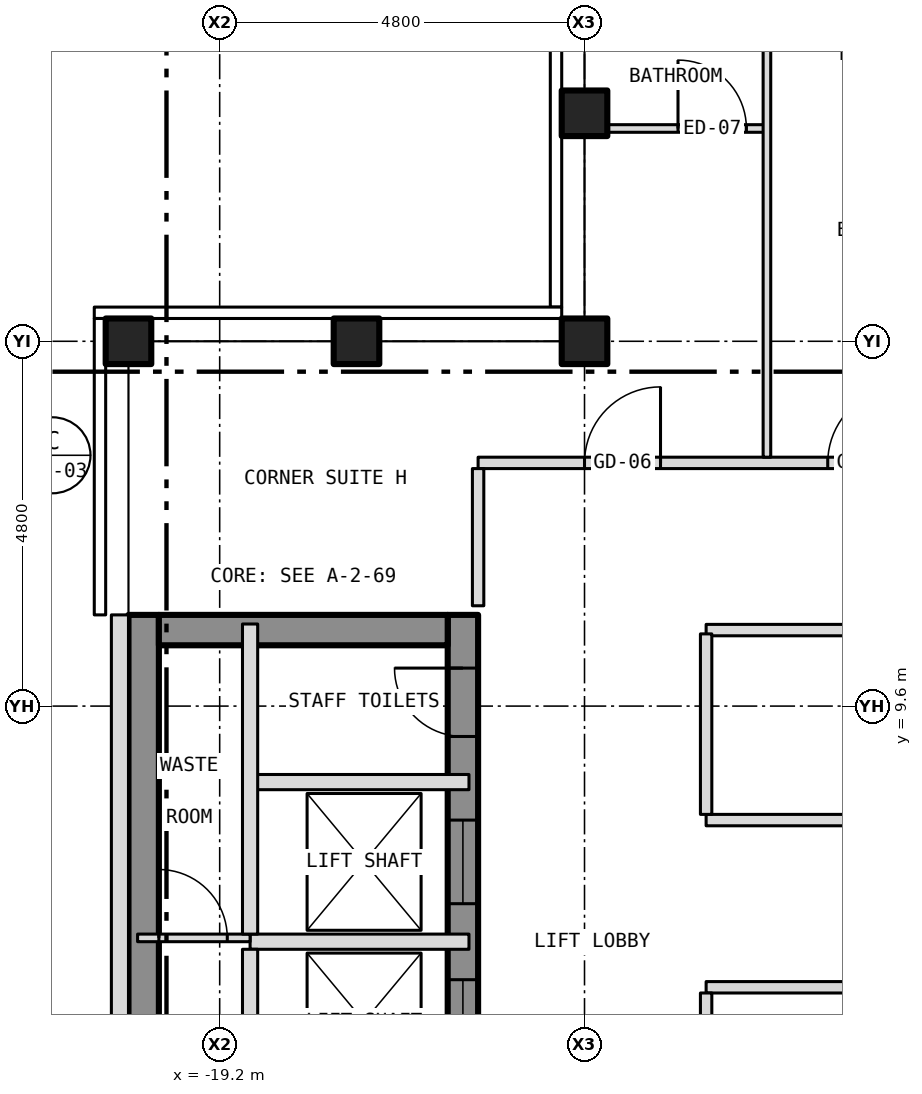
"""IFC4 building model, lengths in metres.
Left out: names, types, materials, properties, quantities, classifications, styles, units other than length and angle.
Written with IfcOpenShell. Run it as: python <this file> out.ifc"""

import sys

from ifc_helpers import new_model, si_unit, direction, frame, frame_2d, origin, origin_2d, place, context, subcontext, project, spatial, rectangle, hollow_rectangle, extrude, element, fill, save


model = new_model("IFC4")
c1 = context("Model", 3, precision=1e-05, world=origin(), true_north=direction((0.0, 1.0)))
c2 = subcontext(c1, "Body", "Model", "MODEL_VIEW")
j1 = project(units=[si_unit("LENGTHUNIT", "METRE"), si_unit("PLANEANGLEUNIT", "RADIAN")], contexts=[c1])
p1 = place(None, origin())
s1 = spatial("IfcSite", under=j1, at=p1, CompositionType="ELEMENT")
p2 = place(p1, origin())
s2 = spatial("IfcBuilding", under=s1, at=p2, CompositionType="ELEMENT")
p3 = place(p2, frame((0.0, 0.0, 251.5)))
s3 = spatial("IfcBuildingStorey", under=s2, at=p3, CompositionType="ELEMENT", Elevation=251.5)
for number, where, z_axis, x_axis in (
    (1, (-20.4, 14.4, -0.15), (0.0, 0.0, 1.0), (1.0, 0.0, 0.0)),
    (2, (-14.4, 14.4, -0.15), (0.0, 0.0, 1.0), (1.0, 0.0, 0.0)),
    (3, (-14.4, 17.4, -0.15), (0.0, 0.0, 1.0), (1.0, 0.0, 0.0)),
    (4, (-17.4, 14.4, -0.15), (0.0, 0.0, 1.0), (1.0, 0.0, 0.0)),
):
    element("IfcColumn", number, at=place(p3, frame(where, z_axis=z_axis, x_axis=x_axis)), inside=s3, PredefinedType="COLUMN", context=c2, shape_type="SweptSolid", body=[
        extrude(hollow_rectangle(XDim=0.6, YDim=0.6, WallThickness=0.03, at=origin_2d()), origin(), (0.0, 0.0, 1.0), 3.5),
    ])
p4 = place(p3, frame((-16.0, -10.8, 0.0), z_axis=(0.0, 0.0, 1.0), x_axis=(0.0, 1.0, 0.0)))
e5 = element("IfcWall", 5, at=p4, inside=s3, PredefinedType="SHEAR", context=c2, shape_type="SweptSolid", body=[
    extrude(rectangle(XDim=21.6, YDim=0.4, at=frame_2d((10.8, 0.0))), origin(), (0.0, 0.0, 1.0), 3.25),
])
p5 = place(p4, frame((9.4, 0.0, 0.0)))
e6 = element("IfcOpeningElement", 6, at=p5, cuts=e5, PredefinedType="OPENING", context=c2, shape_type="SweptSolid", body=[
    extrude(rectangle(XDim=1.1, YDim=2.1, at=frame_2d((0.55, 1.05))), frame((0.0, 0.212, 0.0), z_axis=(0.0, -1.0, 0.0), x_axis=(1.0, 0.0, 0.0)), (0.0, 0.0, 1.0), 0.424),
])
p6 = place(p4, frame((11.5, 0.0, 0.0)))
e7 = element("IfcOpeningElement", 7, at=p6, cuts=e5, PredefinedType="OPENING", context=c2, shape_type="SweptSolid", body=[
    extrude(rectangle(XDim=1.1, YDim=2.1, at=frame_2d((0.55, 1.05))), frame((0.0, 0.212, 0.0), z_axis=(0.0, -1.0, 0.0), x_axis=(1.0, 0.0, 0.0)), (0.0, 0.0, 1.0), 0.424),
])
p7 = place(p4, frame((13.6, 0.0, 0.0)))
e8 = element("IfcOpeningElement", 8, at=p7, cuts=e5, PredefinedType="OPENING", context=c2, shape_type="SweptSolid", body=[
    extrude(rectangle(XDim=1.1, YDim=2.1, at=frame_2d((0.55, 1.05))), frame((0.0, 0.212, 0.0), z_axis=(0.0, -1.0, 0.0), x_axis=(1.0, 0.0, 0.0)), (0.0, 0.0, 1.0), 0.424),
])
p8 = place(p4, frame((15.7, 0.0, 0.0)))
e9 = element("IfcOpeningElement", 9, at=p8, cuts=e5, PredefinedType="OPENING", context=c2, shape_type="SweptSolid", body=[
    extrude(rectangle(XDim=1.1, YDim=2.1, at=frame_2d((0.55, 1.05))), frame((0.0, 0.212, 0.0), z_axis=(0.0, -1.0, 0.0), x_axis=(1.0, 0.0, 0.0)), (0.0, 0.0, 1.0), 0.424),
])
p9 = place(p4, frame((17.8, 0.0, 0.0)))
e10 = element("IfcOpeningElement", 10, at=p9, cuts=e5, PredefinedType="OPENING", context=c2, shape_type="SweptSolid", body=[
    extrude(rectangle(XDim=1.1, YDim=2.1, at=frame_2d((0.55, 1.05))), frame((0.0, 0.212, 0.0), z_axis=(0.0, -1.0, 0.0), x_axis=(1.0, 0.0, 0.0)), (0.0, 0.0, 1.0), 0.424),
])
p10 = place(p4, frame((0.458, 0.0, 0.0)))
e11 = element("IfcOpeningElement", 11, at=p10, cuts=e5, PredefinedType="OPENING", context=c2, shape_type="SweptSolid", body=[
    extrude(rectangle(XDim=1.1, YDim=2.1, at=frame_2d((0.55, 1.05))), frame((0.0, 0.212, 0.0), z_axis=(0.0, -1.0, 0.0), x_axis=(1.0, 0.0, 0.0)), (0.0, 0.0, 1.0), 0.424),
])
p11 = place(p4, frame((7.5, 0.0, 0.0)))
e12 = element("IfcOpeningElement", 12, at=p11, cuts=e5, PredefinedType="OPENING", context=c2, shape_type="SweptSolid", body=[
    extrude(rectangle(XDim=1.1, YDim=2.1, at=frame_2d((0.55, 1.05))), frame((0.0, 0.212, 0.0), z_axis=(0.0, -1.0, 0.0), x_axis=(1.0, 0.0, 0.0)), (0.0, 0.0, 1.0), 0.424),
])
p12 = place(p4, frame((20.0, 0.0, 0.0)))
e13 = element("IfcOpeningElement", 13, at=p12, cuts=e5, PredefinedType="OPENING", context=c2, shape_type="SweptSolid", body=[
    extrude(rectangle(XDim=0.9, YDim=2.1, at=frame_2d((0.45, 1.05))), frame((0.0, 0.212, 0.0), z_axis=(0.0, -1.0, 0.0), x_axis=(1.0, 0.0, 0.0)), (0.0, 0.0, 1.0), 0.424),
])
p13 = place(p3, frame((-20.2, -10.8, 0.0), z_axis=(0.0, 0.0, 1.0), x_axis=(0.0, 1.0, 0.0)))
e14 = element("IfcWall", 14, at=p13, inside=s3, PredefinedType="SHEAR", context=c2, shape_type="SweptSolid", body=[
    extrude(rectangle(XDim=21.6, YDim=0.4, at=frame_2d((10.8, 0.0))), origin(), (0.0, 0.0, 1.0), 3.25),
])
p14 = place(p3, frame((-20.0, 10.6, 0.0), z_axis=(0.0, 0.0, 1.0), x_axis=(1.0, 0.0, 0.0)))
e15 = element("IfcWall", 15, at=p14, inside=s3, PredefinedType="SHEAR", context=c2, shape_type="SweptSolid", body=[
    extrude(rectangle(XDim=3.8, YDim=0.4, at=frame_2d((1.9, 0.0))), origin(), (0.0, 0.0, 1.0), 3.25),
])
p15 = place(p3, frame((-20.512, 10.8, 0.0), z_axis=(0.0, 0.0, 1.0), x_axis=(0.0, -1.0, 0.0)))
e16 = element("IfcWall", 16, at=p15, inside=s3, PredefinedType="SOLIDWALL", context=c2, shape_type="SweptSolid", body=[
    extrude(rectangle(XDim=21.6, YDim=0.225, at=frame_2d((10.8, 0.0))), origin(), (0.0, 0.0, 1.0), 3.5),
])
p16 = place(p15, frame((18.05, 0.0, 1.0)))
e17 = element("IfcOpeningElement", 17, at=p16, cuts=e16, PredefinedType="OPENING", context=c2, shape_type="SweptSolid", body=[
    extrude(rectangle(XDim=0.6, YDim=1.5, at=frame_2d((0.3, 0.75))), frame((0.0, 0.125, 0.0), z_axis=(0.0, -1.0, 0.0), x_axis=(1.0, 0.0, 0.0)), (0.0, 0.0, 1.0), 0.249),
])
p17 = place(p3, frame((-12.8, 5.9, 0.0), z_axis=(0.0, 0.0, 1.0), x_axis=(1.0, 0.0, 0.0)))
e18 = element("IfcWall", 18, at=p17, inside=s3, PredefinedType="PARTITIONING", context=c2, shape_type="SweptSolid", body=[
    extrude(rectangle(XDim=15.4, YDim=0.15, at=frame_2d((7.7, 0.0))), origin(), (0.0, 0.0, 1.0), 3.35),
])
p18 = place(p17, frame((8.85, 0.0, 0.0)))
e19 = element("IfcOpeningElement", 19, at=p18, cuts=e18, PredefinedType="OPENING", context=c2, shape_type="SweptSolid", body=[
    extrude(rectangle(XDim=0.9, YDim=2.1, at=frame_2d((0.45, 1.05))), frame((0.0, 0.087, 0.0), z_axis=(0.0, -1.0, 0.0), x_axis=(1.0, 0.0, 0.0)), (0.0, 0.0, 1.0), 0.174),
])
p19 = place(p3, frame((-18.8, 6.5, 0.0), z_axis=(0.0, 0.0, 1.0), x_axis=(1.0, 0.0, 0.0)))
e20 = element("IfcWall", 20, at=p19, inside=s3, PredefinedType="PARTITIONING", context=c2, shape_type="SweptSolid", body=[
    extrude(rectangle(XDim=2.88, YDim=0.2, at=frame_2d((1.44, 0.0))), origin(), (0.0, 0.0, 1.0), 3.25),
])
p20 = place(p3, frame((-20.28, 6.55, 0.0), z_axis=(0.0, 0.0, 1.0), x_axis=(1.0, 0.0, 0.0)))
e21 = element("IfcWall", 21, at=p20, inside=s3, PredefinedType="PARTITIONING", context=c2, shape_type="SweptSolid", body=[
    extrude(rectangle(XDim=1.48, YDim=0.1, at=frame_2d((0.74, 0.0))), origin(), (0.0, 0.0, 1.0), 3.25),
])
p21 = place(p20, frame((0.28, 0.0, 0.0)))
e22 = element("IfcOpeningElement", 22, at=p21, cuts=e21, PredefinedType="OPENING", context=c2, shape_type="SweptSolid", body=[
    extrude(rectangle(XDim=0.9, YDim=2.1, at=frame_2d((0.45, 1.05))), frame((0.0, 0.062, 0.0), z_axis=(0.0, -1.0, 0.0), x_axis=(1.0, 0.0, 0.0)), (0.0, 0.0, 1.0), 0.124),
])
p22 = place(p3, frame((-12.8, 8.1, 0.0), z_axis=(0.0, 0.0, 1.0), x_axis=(1.0, 0.0, 0.0)))
e23 = element("IfcWall", 23, at=p22, inside=s3, PredefinedType="PARTITIONING", context=c2, shape_type="SweptSolid", body=[
    extrude(rectangle(XDim=15.4, YDim=0.15, at=frame_2d((7.7, 0.0))), origin(), (0.0, 0.0, 1.0), 3.35),
])
p23 = place(p3, frame((-18.8, 8.6, 0.0), z_axis=(0.0, 0.0, 1.0), x_axis=(1.0, 0.0, 0.0)))
e24 = element("IfcWall", 24, at=p23, inside=s3, PredefinedType="PARTITIONING", context=c2, shape_type="SweptSolid", body=[
    extrude(rectangle(XDim=2.88, YDim=0.2, at=frame_2d((1.44, 0.0))), origin(), (0.0, 0.0, 1.0), 3.25),
])
p24 = place(p3, frame((-12.8, 10.6, 0.0), z_axis=(0.0, 0.0, 1.0), x_axis=(1.0, 0.0, 0.0)))
e25 = element("IfcWall", 25, at=p24, inside=s3, PredefinedType="PARTITIONING", context=c2, shape_type="SweptSolid", body=[
    extrude(rectangle(XDim=15.4, YDim=0.15, at=frame_2d((7.7, 0.0))), origin(), (0.0, 0.0, 1.0), 3.35),
])
p25 = place(p24, frame((8.85, 0.0, 0.0)))
e26 = element("IfcOpeningElement", 26, at=p25, cuts=e25, PredefinedType="OPENING", context=c2, shape_type="SweptSolid", body=[
    extrude(rectangle(XDim=0.9, YDim=2.1, at=frame_2d((0.45, 1.05))), frame((0.0, 0.087, 0.0), z_axis=(0.0, -1.0, 0.0), x_axis=(1.0, 0.0, 0.0)), (0.0, 0.0, 1.0), 0.174),
])
p26 = place(p3, frame((-15.8, 12.8, 0.0), z_axis=(0.0, 0.0, 1.0), x_axis=(1.0, 0.0, 0.0)))
e27 = element("IfcWall", 27, at=p26, inside=s3, PredefinedType="PARTITIONING", context=c2, shape_type="SweptSolid", body=[
    extrude(rectangle(XDim=31.6, YDim=0.15, at=frame_2d((15.8, 0.0))), origin(), (0.0, 0.0, 1.0), 3.35),
])
p27 = place(p26, frame((4.6, 0.0, 0.0)))
e28 = element("IfcOpeningElement", 28, at=p27, cuts=e27, PredefinedType="OPENING", context=c2, shape_type="SweptSolid", body=[
    extrude(rectangle(XDim=1.0, YDim=2.1, at=frame_2d((0.5, 1.05))), frame((0.0, 0.087, 0.0), z_axis=(0.0, -1.0, 0.0), x_axis=(1.0, 0.0, 0.0)), (0.0, 0.0, 1.0), 0.174),
])
p28 = place(p26, frame((10.26, 0.0, 0.0)))
e29 = element("IfcOpeningElement", 29, at=p28, cuts=e27, PredefinedType="OPENING", context=c2, shape_type="SweptSolid", body=[
    extrude(rectangle(XDim=1.0, YDim=2.1, at=frame_2d((0.5, 1.05))), frame((0.0, 0.087, 0.0), z_axis=(0.0, -1.0, 0.0), x_axis=(1.0, 0.0, 0.0)), (0.0, 0.0, 1.0), 0.174),
])
p29 = place(p26, frame((19.86, 0.0, 0.0)))
e30 = element("IfcOpeningElement", 30, at=p29, cuts=e27, PredefinedType="OPENING", context=c2, shape_type="SweptSolid", body=[
    extrude(rectangle(XDim=1.0, YDim=2.1, at=frame_2d((0.5, 1.05))), frame((0.0, 0.087, 0.0), z_axis=(0.0, -1.0, 0.0), x_axis=(1.0, 0.0, 0.0)), (0.0, 0.0, 1.0), 0.174),
])
p30 = place(p26, frame((1.4, 0.0, 0.0)))
e31 = element("IfcOpeningElement", 31, at=p30, cuts=e27, PredefinedType="OPENING", context=c2, shape_type="SweptSolid", body=[
    extrude(rectangle(XDim=1.0, YDim=2.1, at=frame_2d((0.5, 1.05))), frame((0.0, 0.087, 0.0), z_axis=(0.0, -1.0, 0.0), x_axis=(1.0, 0.0, 0.0)), (0.0, 0.0, 1.0), 0.174),
])
p31 = place(p26, frame((29.2, 0.0, 0.0)))
e32 = element("IfcOpeningElement", 32, at=p31, cuts=e27, PredefinedType="OPENING", context=c2, shape_type="SweptSolid", body=[
    extrude(rectangle(XDim=1.0, YDim=2.1, at=frame_2d((0.5, 1.05))), frame((0.0, 0.087, 0.0), z_axis=(0.0, -1.0, 0.0), x_axis=(1.0, 0.0, 0.0)), (0.0, 0.0, 1.0), 0.174),
])
p32 = place(p3, frame((-14.28, 17.2, 0.0), z_axis=(0.0, 0.0, 1.0), x_axis=(1.0, 0.0, 0.0)))
e33 = element("IfcWall", 33, at=p32, inside=s3, PredefinedType="PARTITIONING", context=c2, shape_type="SweptSolid", body=[
    extrude(rectangle(XDim=2.28, YDim=0.1, at=frame_2d((1.14, 0.0))), origin(), (0.0, 0.0, 1.0), 3.35),
])
p33 = place(p32, frame((1.11, 0.0, 0.0)))
e34 = element("IfcOpeningElement", 34, at=p33, cuts=e33, PredefinedType="OPENING", context=c2, shape_type="SweptSolid", body=[
    extrude(rectangle(XDim=0.9, YDim=2.1, at=frame_2d((0.45, 1.05))), frame((0.0, 0.062, 0.0), z_axis=(0.0, -1.0, 0.0), x_axis=(1.0, 0.0, 0.0)), (0.0, 0.0, 1.0), 0.124),
])
p34 = place(p3, frame((-18.8, 2.4, 0.0), z_axis=(0.0, 0.0, 1.0), x_axis=(0.0, 1.0, 0.0)))
e35 = element("IfcWall", 35, at=p34, inside=s3, PredefinedType="PARTITIONING", context=c2, shape_type="SweptSolid", body=[
    extrude(rectangle(XDim=4.0, YDim=0.2, at=frame_2d((2.0, 0.0))), origin(), (0.0, 0.0, 1.0), 3.25),
])
p35 = place(p3, frame((-18.8, 6.6, 0.0), z_axis=(0.0, 0.0, 1.0), x_axis=(0.0, 1.0, 0.0)))
e36 = element("IfcWall", 36, at=p35, inside=s3, PredefinedType="PARTITIONING", context=c2, shape_type="SweptSolid", body=[
    extrude(rectangle(XDim=4.08, YDim=0.2, at=frame_2d((2.04, 0.0))), origin(), (0.0, 0.0, 1.0), 3.25),
])
p36 = place(p3, frame((-15.8, 10.92, 0.0), z_axis=(0.0, 0.0, 1.0), x_axis=(0.0, 1.0, 0.0)))
e37 = element("IfcWall", 37, at=p36, inside=s3, PredefinedType="PARTITIONING", context=c2, shape_type="SweptSolid", body=[
    extrude(rectangle(XDim=1.805, YDim=0.15, at=frame_2d((0.903, 0.0))), origin(), (0.0, 0.0, 1.0), 3.35),
])
p37 = place(p3, frame((-12.8, 2.4, 0.0), z_axis=(0.0, 0.0, 1.0), x_axis=(0.0, 1.0, 0.0)))
e38 = element("IfcWall", 38, at=p37, inside=s3, PredefinedType="PARTITIONING", context=c2, shape_type="SweptSolid", body=[
    extrude(rectangle(XDim=3.425, YDim=0.15, at=frame_2d((1.712, 0.0))), origin(), (0.0, 0.0, 1.0), 3.35),
])
p38 = place(p37, frame((1.25, 0.0, 0.0)))
e39 = element("IfcOpeningElement", 39, at=p38, cuts=e38, PredefinedType="OPENING", context=c2, shape_type="SweptSolid", body=[
    extrude(rectangle(XDim=0.9, YDim=2.1, at=frame_2d((0.45, 1.05))), frame((0.0, 0.087, 0.0), z_axis=(0.0, -1.0, 0.0), x_axis=(1.0, 0.0, 0.0)), (0.0, 0.0, 1.0), 0.174),
])
p39 = place(p3, frame((-12.8, 8.175, 0.0), z_axis=(0.0, 0.0, 1.0), x_axis=(0.0, 1.0, 0.0)))
e40 = element("IfcWall", 40, at=p39, inside=s3, PredefinedType="PARTITIONING", context=c2, shape_type="SweptSolid", body=[
    extrude(rectangle(XDim=2.375, YDim=0.15, at=frame_2d((1.188, 0.0))), origin(), (0.0, 0.0, 1.0), 3.35),
])
p40 = place(p3, frame((-12.0, 12.875, 0.0), z_axis=(0.0, 0.0, 1.0), x_axis=(0.0, 1.0, 0.0)))
e41 = element("IfcWall", 41, at=p40, inside=s3, PredefinedType="PARTITIONING", context=c2, shape_type="SweptSolid", body=[
    extrude(rectangle(XDim=7.855, YDim=0.1, at=frame_2d((3.927, 0.0))), origin(), (0.0, 0.0, 1.0), 3.35),
])
p41 = place(p8, origin())
e42 = element("IfcDoor", 42, at=p41, inside=s3, OperationType="SLIDING_TO_LEFT", PredefinedType="DOOR", context=c2, shape_type="SweptSolid", body=[
    extrude(rectangle(XDim=1.1, YDim=2.1, at=frame_2d((0.55, 1.05))), frame((0.0, 0.025, 0.0), z_axis=(0.0, -1.0, 0.0), x_axis=(1.0, 0.0, 0.0)), (0.0, 0.0, 1.0), 0.05),
])
fill(e9, e42)
p42 = place(p9, origin())
e43 = element("IfcDoor", 43, at=p42, inside=s3, OperationType="SLIDING_TO_LEFT", PredefinedType="DOOR", context=c2, shape_type="SweptSolid", body=[
    extrude(rectangle(XDim=1.1, YDim=2.1, at=frame_2d((0.55, 1.05))), frame((0.0, 0.025, 0.0), z_axis=(0.0, -1.0, 0.0), x_axis=(1.0, 0.0, 0.0)), (0.0, 0.0, 1.0), 0.05),
])
fill(e10, e43)
p43 = place(p12, origin())
e44 = element("IfcDoor", 44, at=p43, inside=s3, OperationType="SINGLE_SWING_RIGHT", PredefinedType="DOOR", context=c2, shape_type="SweptSolid", body=[
    extrude(rectangle(XDim=0.9, YDim=2.1, at=frame_2d((0.45, 1.05))), frame((0.0, 0.025, 0.0), z_axis=(0.0, -1.0, 0.0), x_axis=(1.0, 0.0, 0.0)), (0.0, 0.0, 1.0), 0.05),
])
fill(e13, e44)
p44 = place(p21, origin())
e45 = element("IfcDoor", 45, at=p44, inside=s3, OperationType="SINGLE_SWING_LEFT", PredefinedType="DOOR", context=c2, shape_type="SweptSolid", body=[
    extrude(rectangle(XDim=0.9, YDim=2.1, at=frame_2d((0.45, 1.05))), frame((0.0, 0.025, 0.0), z_axis=(0.0, -1.0, 0.0), x_axis=(1.0, 0.0, 0.0)), (0.0, 0.0, 1.0), 0.05),
])
fill(e22, e45)
p45 = place(p27, origin())
e46 = element("IfcDoor", 46, at=p45, inside=s3, OperationType="SINGLE_SWING_RIGHT", PredefinedType="DOOR", context=c2, shape_type="SweptSolid", body=[
    extrude(rectangle(XDim=1.0, YDim=2.1, at=frame_2d((0.5, 1.05))), frame((0.0, 0.025, 0.0), z_axis=(0.0, -1.0, 0.0), x_axis=(1.0, 0.0, 0.0)), (0.0, 0.0, 1.0), 0.05),
])
fill(e28, e46)
p46 = place(p33, origin())
e47 = element("IfcDoor", 47, at=p46, inside=s3, OperationType="SINGLE_SWING_LEFT", PredefinedType="DOOR", context=c2, shape_type="SweptSolid", body=[
    extrude(rectangle(XDim=0.9, YDim=2.1, at=frame_2d((0.45, 1.05))), frame((0.0, 0.025, 0.0), z_axis=(0.0, -1.0, 0.0), x_axis=(1.0, 0.0, 0.0)), (0.0, 0.0, 1.0), 0.05),
])
fill(e34, e47)
p47 = place(p30, origin())
e48 = element("IfcDoor", 48, at=p47, inside=s3, OperationType="SINGLE_SWING_RIGHT", PredefinedType="DOOR", context=c2, shape_type="SweptSolid", body=[
    extrude(rectangle(XDim=1.0, YDim=2.1, at=frame_2d((0.5, 1.05))), frame((0.0, 0.025, 0.0), z_axis=(0.0, -1.0, 0.0), x_axis=(1.0, 0.0, 0.0)), (0.0, 0.0, 1.0), 0.05),
])
fill(e31, e48)
save(model, sys.argv[1])
